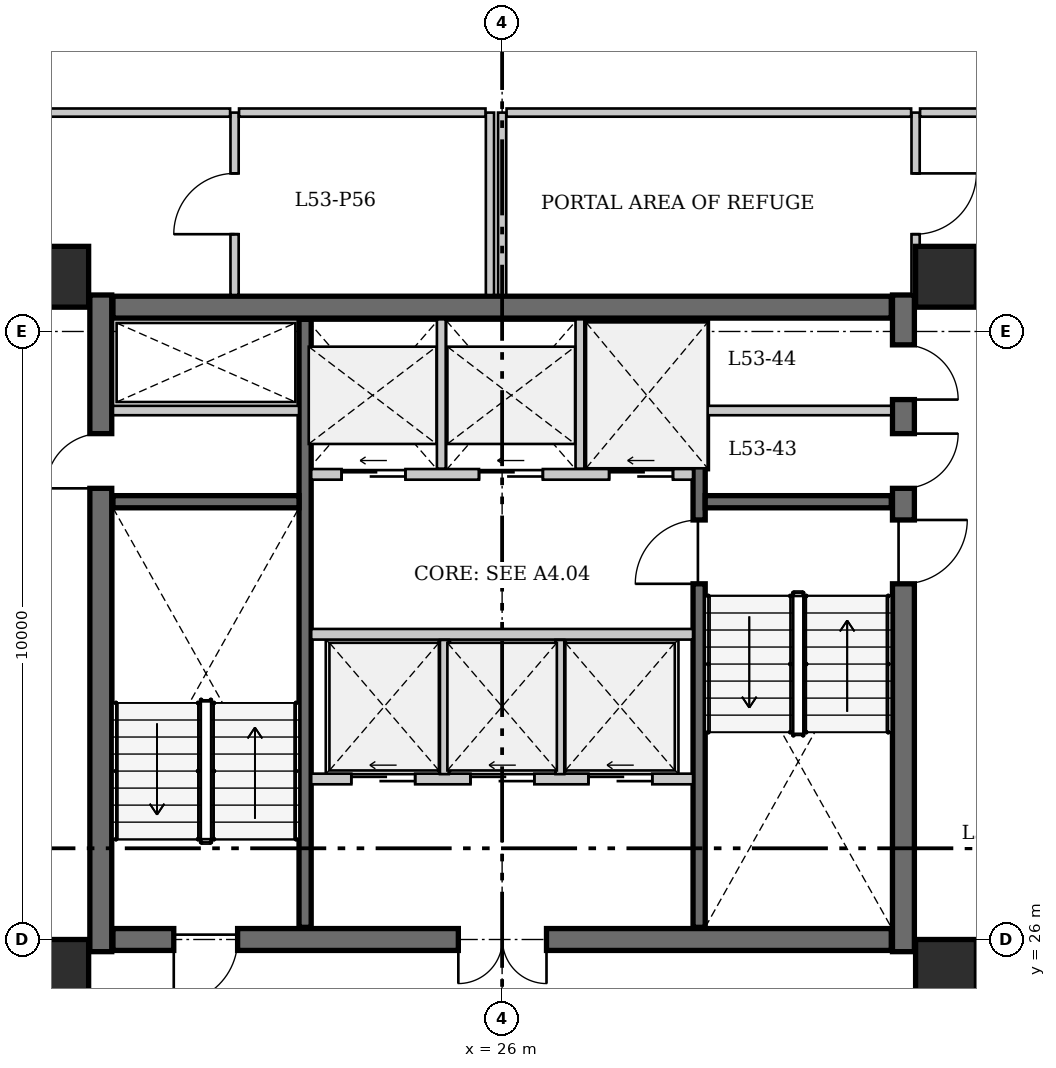
"""IFC4 building model, lengths in metres.
Left out: names, types, materials, properties, quantities, classifications, styles, units other than length and angle.
Written with IfcOpenShell. Run it as: python <this file> out.ifc"""

import sys

from ifc_helpers import new_model, si_unit, direction, frame, frame_2d, origin, origin_2d, place, context, subcontext, project, spatial, rectangle, extrude, source, transform, mapped, element, fill, save


model = new_model("IFC4")
c1 = context("Model", 3, precision=1e-05, world=origin(), true_north=direction((0.0, 1.0)))
c2 = subcontext(c1, "Body", "Model", "MODEL_VIEW")
j1 = project(units=[si_unit("LENGTHUNIT", "METRE"), si_unit("PLANEANGLEUNIT", "RADIAN")], contexts=[c1])
p1 = place(None, origin())
s1 = spatial("IfcSite", under=j1, at=p1, CompositionType="ELEMENT")
p2 = place(p1, origin())
s2 = spatial("IfcBuilding", under=s1, at=p2, CompositionType="ELEMENT")
p3 = place(p2, frame((0.0, 0.0, 202.0)))
s3 = spatial("IfcBuildingStorey", under=s2, at=p3, CompositionType="ELEMENT", Elevation=202.0)
for number, where, z_axis, x_axis in (
    (1, (18.7, 25.5, 0.0), (0.0, 0.0, 1.0), (1.0, 0.0, 0.0)),
    (2, (33.3, 25.5, 0.0), (0.0, 0.0, 1.0), (1.0, 0.0, 0.0)),
    (3, (33.3, 36.9, 0.0), (0.0, 0.0, 1.0), (1.0, 0.0, 0.0)),
    (4, (18.7, 36.9, 0.0), (0.0, 0.0, 1.0), (1.0, 0.0, 0.0)),
):
    element("IfcColumn", number, at=place(p3, frame(where, z_axis=z_axis, x_axis=x_axis)), inside=s3, PredefinedType="COLUMN", context=c2, shape_type="SweptSolid", body=[
        extrude(rectangle(XDim=1.0, YDim=1.0, at=origin_2d()), origin(), (0.0, 0.0, 1.0), 5.93),
    ])
p4 = place(p3, frame((19.4, 25.8, 0.0), z_axis=(0.0, 0.0, 1.0), x_axis=(0.0, 1.0, 0.0)))
e5 = element("IfcWall", 5, at=p4, inside=s3, PredefinedType="SHEAR", context=c2, shape_type="SweptSolid", body=[
    extrude(rectangle(XDim=10.8, YDim=0.36, at=frame_2d((5.4, 0.0))), origin(), (0.0, 0.0, 1.0), 6.2),
])
p5 = place(p4, frame((7.62, 0.0, 0.0)))
e6 = element("IfcOpeningElement", 6, at=p5, cuts=e5, PredefinedType="OPENING", context=c2, shape_type="SweptSolid", body=[
    extrude(rectangle(XDim=0.9, YDim=2.1, at=frame_2d((0.45, 1.05))), frame((0.0, 0.19, 0.0), z_axis=(0.0, -1.0, 0.0), x_axis=(1.0, 0.0, 0.0)), (0.0, 0.0, 1.0), 0.38),
])
p6 = place(p3, frame((32.6, 36.6, 0.0), z_axis=(0.0, 0.0, 1.0), x_axis=(0.0, -1.0, 0.0)))
e7 = element("IfcWall", 7, at=p6, inside=s3, PredefinedType="SHEAR", context=c2, shape_type="SweptSolid", body=[
    extrude(rectangle(XDim=10.8, YDim=0.36, at=frame_2d((5.4, 0.0))), origin(), (0.0, 0.0, 1.0), 6.2),
])
p7 = place(p6, frame((3.7, 0.0, 0.0)))
e8 = element("IfcOpeningElement", 8, at=p7, cuts=e7, PredefinedType="OPENING", context=c2, shape_type="SweptSolid", body=[
    extrude(rectangle(XDim=1.05, YDim=2.15, at=frame_2d((0.525, 1.075))), frame((0.0, 0.19, 0.0), z_axis=(0.0, -1.0, 0.0), x_axis=(1.0, 0.0, 0.0)), (0.0, 0.0, 1.0), 0.38),
])
p8 = place(p6, frame((2.28, 0.0, 0.0)))
e9 = element("IfcOpeningElement", 9, at=p8, cuts=e7, PredefinedType="OPENING", context=c2, shape_type="SweptSolid", body=[
    extrude(rectangle(XDim=0.9, YDim=2.1, at=frame_2d((0.45, 1.05))), frame((0.0, 0.19, 0.0), z_axis=(0.0, -1.0, 0.0), x_axis=(1.0, 0.0, 0.0)), (0.0, 0.0, 1.0), 0.38),
])
p9 = place(p6, frame((0.82, 0.0, 0.0)))
e10 = element("IfcOpeningElement", 10, at=p9, cuts=e7, PredefinedType="OPENING", context=c2, shape_type="SweptSolid", body=[
    extrude(rectangle(XDim=0.9, YDim=2.1, at=frame_2d((0.45, 1.05))), frame((0.0, 0.19, 0.0), z_axis=(0.0, -1.0, 0.0), x_axis=(1.0, 0.0, 0.0)), (0.0, 0.0, 1.0), 0.38),
])
p10 = place(p3, frame((19.6, 36.4, 0.0), z_axis=(0.0, 0.0, 1.0), x_axis=(1.0, 0.0, 0.0)))
e11 = element("IfcWall", 11, at=p10, inside=s3, PredefinedType="SHEAR", context=c2, shape_type="SweptSolid", body=[
    extrude(rectangle(XDim=12.8, YDim=0.36, at=frame_2d((6.4, 0.0))), origin(), (0.0, 0.0, 1.0), 6.2),
])
p11 = place(p3, frame((32.4, 26.0, 0.0), z_axis=(0.0, 0.0, 1.0), x_axis=(-1.0, 0.0, 0.0)))
e12 = element("IfcWall", 12, at=p11, inside=s3, PredefinedType="SHEAR", context=c2, shape_type="SweptSolid", body=[
    extrude(rectangle(XDim=12.8, YDim=0.36, at=frame_2d((6.4, 0.0))), origin(), (0.0, 0.0, 1.0), 6.2),
])
p12 = place(p11, frame((10.75, 0.0, 0.0)))
e13 = element("IfcOpeningElement", 13, at=p12, cuts=e12, PredefinedType="OPENING", context=c2, shape_type="SweptSolid", body=[
    extrude(rectangle(XDim=1.05, YDim=2.15, at=frame_2d((0.525, 1.075))), frame((0.0, 0.19, 0.0), z_axis=(0.0, -1.0, 0.0), x_axis=(1.0, 0.0, 0.0)), (0.0, 0.0, 1.0), 0.38),
])
p13 = place(p11, frame((5.67, 0.0, 0.0)))
e14 = element("IfcOpeningElement", 14, at=p13, cuts=e12, PredefinedType="OPENING", context=c2, shape_type="SweptSolid", body=[
    extrude(rectangle(XDim=1.45, YDim=2.2, at=frame_2d((0.725, 1.1))), frame((0.0, 0.19, 0.0), z_axis=(0.0, -1.0, 0.0), x_axis=(1.0, 0.0, 0.0)), (0.0, 0.0, 1.0), 0.38),
])
p14 = place(p3, frame((22.76, 26.2, 0.0), z_axis=(0.0, 0.0, 1.0), x_axis=(0.0, 1.0, 0.0)))
e15 = element("IfcWall", 15, at=p14, inside=s3, PredefinedType="SHEAR", context=c2, shape_type="SweptSolid", body=[
    extrude(rectangle(XDim=10.0, YDim=0.2, at=frame_2d((5.0, 0.0))), origin(), (0.0, 0.0, 1.0), 6.2),
])
p15 = place(p3, frame((29.24, 26.2, 0.0), z_axis=(0.0, 0.0, 1.0), x_axis=(0.0, 1.0, 0.0)))
e16 = element("IfcWall", 16, at=p15, inside=s3, PredefinedType="SHEAR", context=c2, shape_type="SweptSolid", body=[
    extrude(rectangle(XDim=10.0, YDim=0.2, at=frame_2d((5.0, 0.0))), origin(), (0.0, 0.0, 1.0), 6.2),
])
p16 = place(p15, frame((5.65, 0.0, 0.0)))
e17 = element("IfcOpeningElement", 17, at=p16, cuts=e16, PredefinedType="OPENING", context=c2, shape_type="SweptSolid", body=[
    extrude(rectangle(XDim=1.05, YDim=2.15, at=frame_2d((0.525, 1.075))), frame((0.0, 0.11, 0.0), z_axis=(0.0, -1.0, 0.0), x_axis=(1.0, 0.0, 0.0)), (0.0, 0.0, 1.0), 0.22),
])
for number, where, z_axis, x_axis in (
    (18, (19.6, 33.2, 0.0), (0.0, 0.0, 1.0), (1.0, 0.0, 0.0)),
    (19, (29.34, 33.2, 0.0), (0.0, 0.0, 1.0), (1.0, 0.0, 0.0)),
):
    element("IfcWall", number, at=place(p3, frame(where, z_axis=z_axis, x_axis=x_axis)), inside=s3, PredefinedType="SHEAR", context=c2, shape_type="SweptSolid", body=[
        extrude(rectangle(XDim=3.06, YDim=0.2, at=frame_2d((1.53, 0.0))), origin(), (0.0, 0.0, 1.0), 6.2),
    ])
p17 = place(p3, frame((22.86, 33.65, 0.0), z_axis=(0.0, 0.0, 1.0), x_axis=(1.0, 0.0, 0.0)))
e20 = element("IfcWall", 20, at=p17, inside=s3, PredefinedType="SOLIDWALL", context=c2, shape_type="SweptSolid", body=[
    extrude(rectangle(XDim=6.28, YDim=0.175, at=frame_2d((3.14, 0.0))), origin(), (0.0, 0.0, 1.0), 5.93),
])
p18 = place(p17, frame((0.5, 0.0, 0.0)))
e21 = element("IfcOpeningElement", 21, at=p18, cuts=e20, PredefinedType="OPENING", context=c2, shape_type="SweptSolid", body=[
    extrude(rectangle(XDim=1.05, YDim=2.15, at=frame_2d((0.525, 1.075))), frame((0.0, 0.098, 0.0), z_axis=(0.0, -1.0, 0.0), x_axis=(1.0, 0.0, 0.0)), (0.0, 0.0, 1.0), 0.195),
])
p19 = place(p17, frame((2.76, 0.0, 0.0)))
e22 = element("IfcOpeningElement", 22, at=p19, cuts=e20, PredefinedType="OPENING", context=c2, shape_type="SweptSolid", body=[
    extrude(rectangle(XDim=1.05, YDim=2.15, at=frame_2d((0.525, 1.075))), frame((0.0, 0.098, 0.0), z_axis=(0.0, -1.0, 0.0), x_axis=(1.0, 0.0, 0.0)), (0.0, 0.0, 1.0), 0.195),
])
p20 = place(p17, frame((4.9, 0.0, 0.0)))
e23 = element("IfcOpeningElement", 23, at=p20, cuts=e20, PredefinedType="OPENING", context=c2, shape_type="SweptSolid", body=[
    extrude(rectangle(XDim=1.05, YDim=2.15, at=frame_2d((0.525, 1.075))), frame((0.0, 0.098, 0.0), z_axis=(0.0, -1.0, 0.0), x_axis=(1.0, 0.0, 0.0)), (0.0, 0.0, 1.0), 0.195),
])
for number, where, z_axis, x_axis in (
    (24, (25.0, 33.743, 0.0), (0.0, 0.0, 1.0), (0.0, 1.0, 0.0)),
    (25, (27.28, 33.743, 0.0), (0.0, 0.0, 1.0), (0.0, 1.0, 0.0)),
):
    element("IfcWall", number, at=place(p3, frame(where, z_axis=z_axis, x_axis=x_axis)), inside=s3, PredefinedType="SOLIDWALL", context=c2, shape_type="SweptSolid", body=[
        extrude(rectangle(XDim=2.457, YDim=0.145, at=frame_2d((1.228, 0.0))), origin(), (0.0, 0.0, 1.0), 5.93),
    ])
p21 = place(p3, frame((22.86, 31.02, 0.0), z_axis=(0.0, 0.0, 1.0), x_axis=(1.0, 0.0, 0.0)))
e26 = element("IfcWall", 26, at=p21, inside=s3, PredefinedType="SOLIDWALL", context=c2, shape_type="SweptSolid", body=[
    extrude(rectangle(XDim=6.28, YDim=0.175, at=frame_2d((3.14, 0.0))), origin(), (0.0, 0.0, 1.0), 5.93),
])
p22 = place(p3, frame((22.86, 28.64, 0.0), z_axis=(0.0, 0.0, 1.0), x_axis=(1.0, 0.0, 0.0)))
e27 = element("IfcWall", 27, at=p22, inside=s3, PredefinedType="SOLIDWALL", context=c2, shape_type="SweptSolid", body=[
    extrude(rectangle(XDim=6.28, YDim=0.175, at=frame_2d((3.14, 0.0))), origin(), (0.0, 0.0, 1.0), 5.93),
])
p23 = place(p22, frame((0.66, 0.0, 0.0)))
e28 = element("IfcOpeningElement", 28, at=p23, cuts=e27, PredefinedType="OPENING", context=c2, shape_type="SweptSolid", body=[
    extrude(rectangle(XDim=1.05, YDim=2.15, at=frame_2d((0.525, 1.075))), frame((0.0, 0.098, 0.0), z_axis=(0.0, -1.0, 0.0), x_axis=(1.0, 0.0, 0.0)), (0.0, 0.0, 1.0), 0.195),
])
p24 = place(p22, frame((2.62, 0.0, 0.0)))
e29 = element("IfcOpeningElement", 29, at=p24, cuts=e27, PredefinedType="OPENING", context=c2, shape_type="SweptSolid", body=[
    extrude(rectangle(XDim=1.05, YDim=2.15, at=frame_2d((0.525, 1.075))), frame((0.0, 0.098, 0.0), z_axis=(0.0, -1.0, 0.0), x_axis=(1.0, 0.0, 0.0)), (0.0, 0.0, 1.0), 0.195),
])
p25 = place(p22, frame((4.56, 0.0, 0.0)))
e30 = element("IfcOpeningElement", 30, at=p25, cuts=e27, PredefinedType="OPENING", context=c2, shape_type="SweptSolid", body=[
    extrude(rectangle(XDim=1.05, YDim=2.15, at=frame_2d((0.525, 1.075))), frame((0.0, 0.098, 0.0), z_axis=(0.0, -1.0, 0.0), x_axis=(1.0, 0.0, 0.0)), (0.0, 0.0, 1.0), 0.195),
])
for number, where, z_axis, x_axis in (
    (31, (25.05, 28.72, 0.0), (0.0, 0.0, 1.0), (0.0, 1.0, 0.0)),
    (32, (26.95, 28.72, 0.0), (0.0, 0.0, 1.0), (0.0, 1.0, 0.0)),
):
    element("IfcWall", number, at=place(p3, frame(where, z_axis=z_axis, x_axis=x_axis)), inside=s3, PredefinedType="SOLIDWALL", context=c2, shape_type="SweptSolid", body=[
        extrude(rectangle(XDim=2.207, YDim=0.145, at=frame_2d((1.103, 0.0))), origin(), (0.0, 0.0, 1.0), 5.93),
    ])
for number, where, z_axis, x_axis in (
    (33, (19.6, 34.7, 0.0), (0.0, 0.0, 1.0), (1.0, 0.0, 0.0)),
    (34, (29.34, 34.7, 0.0), (0.0, 0.0, 1.0), (1.0, 0.0, 0.0)),
):
    element("IfcWall", number, at=place(p3, frame(where, z_axis=z_axis, x_axis=x_axis)), inside=s3, PredefinedType="PARTITIONING", context=c2, shape_type="SweptSolid", body=[
        extrude(rectangle(XDim=3.06, YDim=0.155, at=frame_2d((1.53, 0.0))), origin(), (0.0, 0.0, 1.0), 5.93),
    ])
p26 = place(p3, frame((21.6, 36.6, 0.0), z_axis=(0.0, 0.0, 1.0), x_axis=(0.0, 1.0, 0.0)))
e35 = element("IfcWall", 35, at=p26, inside=s3, PredefinedType="PARTITIONING", context=c2, shape_type="SweptSolid", body=[
    extrude(rectangle(XDim=3.0, YDim=0.135, at=frame_2d((1.5, 0.0))), origin(), (0.0, 0.0, 1.0), 5.93),
])
p27 = place(p26, frame((1.0, 0.0, 0.0)))
e36 = element("IfcOpeningElement", 36, at=p27, cuts=e35, PredefinedType="OPENING", context=c2, shape_type="SweptSolid", body=[
    extrude(rectangle(XDim=1.0, YDim=2.15, at=frame_2d((0.5, 1.075))), frame((0.0, 0.078, 0.0), z_axis=(0.0, -1.0, 0.0), x_axis=(1.0, 0.0, 0.0)), (0.0, 0.0, 1.0), 0.155),
])
p28 = place(p3, frame((32.8, 39.6, 0.0), z_axis=(0.0, 0.0, 1.0), x_axis=(0.0, -1.0, 0.0)))
e37 = element("IfcWall", 37, at=p28, inside=s3, PredefinedType="PARTITIONING", context=c2, shape_type="SweptSolid", body=[
    extrude(rectangle(XDim=3.0, YDim=0.135, at=frame_2d((1.5, 0.0))), origin(), (0.0, 0.0, 1.0), 5.93),
])
p29 = place(p28, frame((1.0, 0.0, 0.0)))
e38 = element("IfcOpeningElement", 38, at=p29, cuts=e37, PredefinedType="OPENING", context=c2, shape_type="SweptSolid", body=[
    extrude(rectangle(XDim=1.0, YDim=2.15, at=frame_2d((0.5, 1.075))), frame((0.0, 0.078, 0.0), z_axis=(0.0, -1.0, 0.0), x_axis=(1.0, 0.0, 0.0)), (0.0, 0.0, 1.0), 0.155),
])
p30 = place(p3, frame((25.8, 36.6, 0.0), z_axis=(0.0, 0.0, 1.0), x_axis=(0.0, 1.0, 0.0)))
e39 = element("IfcWall", 39, at=p30, inside=s3, PredefinedType="PARTITIONING", context=c2, shape_type="SweptSolid", body=[
    extrude(rectangle(XDim=3.0, YDim=0.135, at=frame_2d((1.5, 0.0))), origin(), (0.0, 0.0, 1.0), 5.93),
])
p31 = place(p3, frame((21.674, 39.6, 0.0), z_axis=(0.0, 0.0, 1.0), x_axis=(1.0, 0.0, 0.0)))
e40 = element("IfcWall", 40, at=p31, inside=s3, PredefinedType="PARTITIONING", context=c2, shape_type="SweptSolid", body=[
    extrude(rectangle(XDim=4.053, YDim=0.135, at=frame_2d((2.026, 0.0))), origin(), (0.0, 0.0, 1.0), 5.93),
])
p32 = place(p3, frame((26.0, 36.6, 0.0), z_axis=(0.0, 0.0, 1.0), x_axis=(0.0, 1.0, 0.0)))
e41 = element("IfcWall", 41, at=p32, inside=s3, PredefinedType="PARTITIONING", context=c2, shape_type="SweptSolid", body=[
    extrude(rectangle(XDim=3.0, YDim=0.135, at=frame_2d((1.5, 0.0))), origin(), (0.0, 0.0, 1.0), 5.93),
])
p33 = place(p3, frame((26.073, 39.6, 0.0), z_axis=(0.0, 0.0, 1.0), x_axis=(1.0, 0.0, 0.0)))
e42 = element("IfcWall", 42, at=p33, inside=s3, PredefinedType="PARTITIONING", context=c2, shape_type="SweptSolid", body=[
    extrude(rectangle(XDim=6.653, YDim=0.135, at=frame_2d((3.327, 0.0))), origin(), (0.0, 0.0, 1.0), 5.93),
])
p34 = place(p3, frame((17.15, 39.6, 0.0), z_axis=(0.0, 0.0, 1.0), x_axis=(1.0, 0.0, 0.0)))
e43 = element("IfcWall", 43, at=p34, inside=s3, PredefinedType="PARTITIONING", context=c2, shape_type="SweptSolid", body=[
    extrude(rectangle(XDim=4.377, YDim=0.135, at=frame_2d((2.188, 0.0))), origin(), (0.0, 0.0, 1.0), 5.93),
])
p35 = place(p3, frame((32.874, 39.6, 0.0), z_axis=(0.0, 0.0, 1.0), x_axis=(1.0, 0.0, 0.0)))
e44 = element("IfcWall", 44, at=p35, inside=s3, PredefinedType="PARTITIONING", context=c2, shape_type="SweptSolid", body=[
    extrude(rectangle(XDim=2.653, YDim=0.135, at=frame_2d((1.327, 0.0))), origin(), (0.0, 0.0, 1.0), 5.93),
])
m1 = source(origin(), c2, "Body", "SweptSolid", [
    extrude(rectangle(XDim=1.05, YDim=2.15, at=frame_2d((0.525, 1.075))), frame((0.0, 0.025, 0.0), z_axis=(0.0, -1.0, 0.0), x_axis=(1.0, 0.0, 0.0)), (0.0, 0.0, 1.0), 0.05),
])
p36 = place(p12, origin())
e45 = element("IfcDoor", 45, at=p36, inside=s3, OperationType="SINGLE_SWING_RIGHT", PredefinedType="DOOR", context=c2, shape_type="MappedRepresentation", body=[
    mapped(m1, transform((0.0, 0.0, 0.0), x_axis=(1.0, 0.0, 0.0), y_axis=(0.0, 1.0, 0.0), z_axis=(0.0, 0.0, 1.0), scale=1.0)),
])
fill(e13, e45)
m2 = source(origin(), c2, "Body", "SweptSolid", [
    extrude(rectangle(XDim=1.45, YDim=2.2, at=frame_2d((0.725, 1.1))), frame((0.0, 0.025, 0.0), z_axis=(0.0, -1.0, 0.0), x_axis=(1.0, 0.0, 0.0)), (0.0, 0.0, 1.0), 0.05),
])
p37 = place(p13, origin())
e46 = element("IfcDoor", 46, at=p37, inside=s3, OperationType="DOUBLE_DOOR_SINGLE_SWING", PredefinedType="DOOR", context=c2, shape_type="MappedRepresentation", body=[
    mapped(m2, transform((0.0, 0.0, 0.0), x_axis=(1.0, 0.0, 0.0), y_axis=(0.0, 1.0, 0.0), z_axis=(0.0, 0.0, 1.0), scale=1.0)),
])
fill(e14, e46)
p38 = place(p7, origin())
e47 = element("IfcDoor", 47, at=p38, inside=s3, OperationType="SINGLE_SWING_LEFT", PredefinedType="DOOR", context=c2, shape_type="MappedRepresentation", body=[
    mapped(m1, transform((0.0, 0.0, 0.0), x_axis=(1.0, 0.0, 0.0), y_axis=(0.0, 1.0, 0.0), z_axis=(0.0, 0.0, 1.0), scale=1.0)),
])
fill(e8, e47)
p39 = place(p16, origin())
e48 = element("IfcDoor", 48, at=p39, inside=s3, OperationType="SINGLE_SWING_LEFT", PredefinedType="DOOR", context=c2, shape_type="MappedRepresentation", body=[
    mapped(m1, transform((0.0, 0.0, 0.0), x_axis=(1.0, 0.0, 0.0), y_axis=(0.0, 1.0, 0.0), z_axis=(0.0, 0.0, 1.0), scale=1.0)),
])
fill(e17, e48)
m3 = source(origin(), c2, "Body", "SweptSolid", [
    extrude(rectangle(XDim=1.05, YDim=2.15, at=frame_2d((0.525, 1.075))), frame((0.0, 0.025, 0.0), z_axis=(0.0, -1.0, 0.0), x_axis=(1.0, 0.0, 0.0)), (0.0, 0.0, 1.0), 0.05),
])
p40 = place(p18, origin())
e49 = element("IfcDoor", 49, at=p40, inside=s3, OperationType="SLIDING_TO_LEFT", PredefinedType="DOOR", context=c2, shape_type="MappedRepresentation", body=[
    mapped(m3, transform((0.0, 0.0, 0.0), x_axis=(1.0, 0.0, 0.0), y_axis=(0.0, 1.0, 0.0), z_axis=(0.0, 0.0, 1.0), scale=1.0)),
])
fill(e21, e49)
p41 = place(p19, origin())
e50 = element("IfcDoor", 50, at=p41, inside=s3, OperationType="SLIDING_TO_LEFT", PredefinedType="DOOR", context=c2, shape_type="MappedRepresentation", body=[
    mapped(m3, transform((0.0, 0.0, 0.0), x_axis=(1.0, 0.0, 0.0), y_axis=(0.0, 1.0, 0.0), z_axis=(0.0, 0.0, 1.0), scale=1.0)),
])
fill(e22, e50)
p42 = place(p20, origin())
e51 = element("IfcDoor", 51, at=p42, inside=s3, OperationType="SLIDING_TO_LEFT", PredefinedType="DOOR", context=c2, shape_type="MappedRepresentation", body=[
    mapped(m3, transform((0.0, 0.0, 0.0), x_axis=(1.0, 0.0, 0.0), y_axis=(0.0, 1.0, 0.0), z_axis=(0.0, 0.0, 1.0), scale=1.0)),
])
fill(e23, e51)
p43 = place(p23, origin())
e52 = element("IfcDoor", 52, at=p43, inside=s3, OperationType="SLIDING_TO_LEFT", PredefinedType="DOOR", context=c2, shape_type="MappedRepresentation", body=[
    mapped(m3, transform((0.0, 0.0, 0.0), x_axis=(1.0, 0.0, 0.0), y_axis=(0.0, 1.0, 0.0), z_axis=(0.0, 0.0, 1.0), scale=1.0)),
])
fill(e28, e52)
p44 = place(p24, origin())
e53 = element("IfcDoor", 53, at=p44, inside=s3, OperationType="SLIDING_TO_LEFT", PredefinedType="DOOR", context=c2, shape_type="MappedRepresentation", body=[
    mapped(m3, transform((0.0, 0.0, 0.0), x_axis=(1.0, 0.0, 0.0), y_axis=(0.0, 1.0, 0.0), z_axis=(0.0, 0.0, 1.0), scale=1.0)),
])
fill(e29, e53)
p45 = place(p25, origin())
e54 = element("IfcDoor", 54, at=p45, inside=s3, OperationType="SLIDING_TO_LEFT", PredefinedType="DOOR", context=c2, shape_type="MappedRepresentation", body=[
    mapped(m3, transform((0.0, 0.0, 0.0), x_axis=(1.0, 0.0, 0.0), y_axis=(0.0, 1.0, 0.0), z_axis=(0.0, 0.0, 1.0), scale=1.0)),
])
fill(e30, e54)
m4 = source(origin(), c2, "Body", "SweptSolid", [
    extrude(rectangle(XDim=0.9, YDim=2.1, at=frame_2d((0.45, 1.05))), frame((0.0, 0.025, 0.0), z_axis=(0.0, -1.0, 0.0), x_axis=(1.0, 0.0, 0.0)), (0.0, 0.0, 1.0), 0.05),
])
p46 = place(p5, origin())
e55 = element("IfcDoor", 55, at=p46, inside=s3, OperationType="SINGLE_SWING_LEFT", PredefinedType="DOOR", context=c2, shape_type="MappedRepresentation", body=[
    mapped(m4, transform((0.0, 0.0, 0.0), x_axis=(1.0, 0.0, 0.0), y_axis=(0.0, 1.0, 0.0), z_axis=(0.0, 0.0, 1.0), scale=1.0)),
])
fill(e6, e55)
p47 = place(p8, origin())
e56 = element("IfcDoor", 56, at=p47, inside=s3, OperationType="SINGLE_SWING_LEFT", PredefinedType="DOOR", context=c2, shape_type="MappedRepresentation", body=[
    mapped(m4, transform((0.0, 0.0, 0.0), x_axis=(1.0, 0.0, 0.0), y_axis=(0.0, 1.0, 0.0), z_axis=(0.0, 0.0, 1.0), scale=1.0)),
])
fill(e9, e56)
p48 = place(p9, origin())
e57 = element("IfcDoor", 57, at=p48, inside=s3, OperationType="SINGLE_SWING_RIGHT", PredefinedType="DOOR", context=c2, shape_type="MappedRepresentation", body=[
    mapped(m4, transform((0.0, 0.0, 0.0), x_axis=(1.0, 0.0, 0.0), y_axis=(0.0, 1.0, 0.0), z_axis=(0.0, 0.0, 1.0), scale=1.0)),
])
fill(e10, e57)
m5 = source(origin(), c2, "Body", "SweptSolid", [
    extrude(rectangle(XDim=1.0, YDim=2.15, at=frame_2d((0.5, 1.075))), frame((0.0, 0.025, 0.0), z_axis=(0.0, -1.0, 0.0), x_axis=(1.0, 0.0, 0.0)), (0.0, 0.0, 1.0), 0.05),
])
p49 = place(p27, origin())
e58 = element("IfcDoor", 58, at=p49, inside=s3, OperationType="SINGLE_SWING_LEFT", PredefinedType="DOOR", context=c2, shape_type="MappedRepresentation", body=[
    mapped(m5, transform((0.0, 0.0, 0.0), x_axis=(1.0, 0.0, 0.0), y_axis=(0.0, 1.0, 0.0), z_axis=(0.0, 0.0, 1.0), scale=1.0)),
])
fill(e36, e58)
p50 = place(p29, origin())
e59 = element("IfcDoor", 59, at=p50, inside=s3, OperationType="SINGLE_SWING_LEFT", PredefinedType="DOOR", context=c2, shape_type="MappedRepresentation", body=[
    mapped(m5, transform((0.0, 0.0, 0.0), x_axis=(1.0, 0.0, 0.0), y_axis=(0.0, 1.0, 0.0), z_axis=(0.0, 0.0, 1.0), scale=1.0)),
])
fill(e38, e59)
save(model, sys.argv[1])
